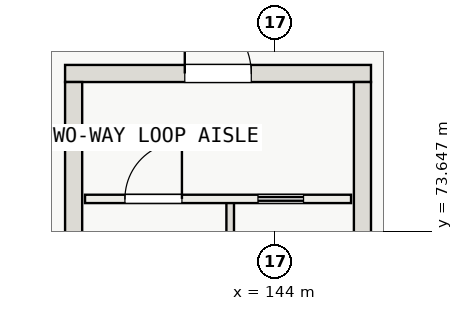
"""IFC4 building model, lengths in metres.
Left out: names, types, materials, properties, quantities, classifications, styles, units other than length and angle.
Written with IfcOpenShell. Run it as: python <this file> out.ifc"""

import sys

from ifc_helpers import new_model, si_unit, direction, frame, frame_2d, origin, place, context, subcontext, project, spatial, rectangle, extrude, element, fill, save


model = new_model("IFC4")
c1 = context("Model", 3, precision=1e-05, world=origin(), true_north=direction((0.0, 1.0)))
c2 = subcontext(c1, "Body", "Model", "MODEL_VIEW")
j1 = project(units=[si_unit("LENGTHUNIT", "METRE"), si_unit("PLANEANGLEUNIT", "RADIAN")], contexts=[c1])
p1 = place(None, origin())
s1 = spatial("IfcSite", under=j1, at=p1, CompositionType="ELEMENT")
p2 = place(p1, origin())
s2 = spatial("IfcBuilding", under=s1, at=p2, CompositionType="ELEMENT")
p3 = place(p2, frame((0.0, 0.0, -4.8)))
s3 = spatial("IfcBuildingStorey", under=s2, at=p3, CompositionType="ELEMENT", Elevation=-4.8)
p4 = place(p3, frame((138.475, 77.8, -0.45), z_axis=(0.0, 0.0, 1.0), x_axis=(1.0, 0.0, 0.0)))
e1 = element("IfcWall", 1, at=p4, inside=s3, PredefinedType="SHEAR", context=c2, shape_type="SweptSolid", body=[
    extrude(rectangle(XDim=8.05, YDim=0.45, at=frame_2d((4.025, 0.0))), origin(), (0.0, 0.0, 1.0), 5.25),
])
p5 = place(p4, frame((3.15, 0.0, 0.45)))
e2 = element("IfcOpeningElement", 2, at=p5, cuts=e1, PredefinedType="OPENING", context=c2, shape_type="SweptSolid", body=[
    extrude(rectangle(XDim=1.75, YDim=2.3, at=frame_2d((0.875, 1.15))), frame((0.0, 0.235, 0.0), z_axis=(0.0, -1.0, 0.0), x_axis=(1.0, 0.0, 0.0)), (0.0, 0.0, 1.0), 0.47),
])
for number, where, z_axis, x_axis in (
    (3, (138.7, 66.425, -0.45), (0.0, 0.0, 1.0), (0.0, 1.0, 0.0)),
    (4, (146.3, 66.425, -0.45), (0.0, 0.0, 1.0), (0.0, 1.0, 0.0)),
):
    element("IfcWall", number, at=place(p3, frame(where, z_axis=z_axis, x_axis=x_axis)), inside=s3, PredefinedType="SHEAR", context=c2, shape_type="SweptSolid", body=[
        extrude(rectangle(XDim=11.15, YDim=0.45, at=frame_2d((5.575, 0.0))), origin(), (0.0, 0.0, 1.0), 5.25),
    ])
p6 = place(p3, frame((142.82, 66.45, -0.45), z_axis=(0.0, 0.0, 1.0), x_axis=(0.0, 1.0, 0.0)))
e5 = element("IfcWall", 5, at=p6, inside=s3, PredefinedType="SOLIDWALL", context=c2, shape_type="SweptSolid", body=[
    extrude(rectangle(XDim=8.0, YDim=0.2, at=frame_2d((4.0, 0.0))), origin(), (0.0, 0.0, 1.0), 5.25),
])
p7 = place(p3, frame((139.0, 74.5, 0.0), z_axis=(0.0, 0.0, 1.0), x_axis=(1.0, 0.0, 0.0)))
e6 = element("IfcWall", 6, at=p7, inside=s3, PredefinedType="SOLIDWALL", context=c2, shape_type="SweptSolid", body=[
    extrude(rectangle(XDim=7.0, YDim=0.22, at=frame_2d((3.5, 0.0))), origin(), (0.0, 0.0, 1.0), 4.4),
])
p8 = place(p7, frame((1.05, 0.0, 0.0)))
e7 = element("IfcOpeningElement", 7, at=p8, cuts=e6, PredefinedType="OPENING", context=c2, shape_type="SweptSolid", body=[
    extrude(rectangle(XDim=1.5, YDim=2.2, at=frame_2d((0.75, 1.1))), frame((0.0, 0.12, 0.0), z_axis=(0.0, -1.0, 0.0), x_axis=(1.0, 0.0, 0.0)), (0.0, 0.0, 1.0), 0.24),
])
p9 = place(p7, frame((4.55, 0.0, 0.0)))
e8 = element("IfcOpeningElement", 8, at=p9, cuts=e6, PredefinedType="OPENING", context=c2, shape_type="SweptSolid", body=[
    extrude(rectangle(XDim=1.2, YDim=2.2, at=frame_2d((0.6, 1.1))), frame((0.0, 0.12, 0.0), z_axis=(0.0, -1.0, 0.0), x_axis=(1.0, 0.0, 0.0)), (0.0, 0.0, 1.0), 0.24),
])
p10 = place(p8, origin())
e9 = element("IfcDoor", 9, at=p10, inside=s3, OperationType="SINGLE_SWING_RIGHT", PredefinedType="DOOR", context=c2, shape_type="SweptSolid", body=[
    extrude(rectangle(XDim=1.5, YDim=2.2, at=frame_2d((0.75, 1.1))), frame((0.0, 0.025, 0.0), z_axis=(0.0, -1.0, 0.0), x_axis=(1.0, 0.0, 0.0)), (0.0, 0.0, 1.0), 0.05),
])
fill(e7, e9)
p11 = place(p9, origin())
e10 = element("IfcDoor", 10, at=p11, inside=s3, OperationType="SLIDING_TO_RIGHT", PredefinedType="DOOR", context=c2, shape_type="SweptSolid", body=[
    extrude(rectangle(XDim=1.2, YDim=2.2, at=frame_2d((0.6, 1.1))), frame((0.0, 0.025, 0.0), z_axis=(0.0, -1.0, 0.0), x_axis=(1.0, 0.0, 0.0)), (0.0, 0.0, 1.0), 0.05),
])
fill(e8, e10)
p12 = place(p5, origin())
e11 = element("IfcDoor", 11, at=p12, inside=s3, OperationType="DOUBLE_DOOR_SINGLE_SWING", PredefinedType="DOOR", context=c2, shape_type="SweptSolid", body=[
    extrude(rectangle(XDim=1.75, YDim=2.3, at=frame_2d((0.875, 1.15))), frame((0.0, 0.025, 0.0), z_axis=(0.0, -1.0, 0.0), x_axis=(1.0, 0.0, 0.0)), (0.0, 0.0, 1.0), 0.05),
])
fill(e2, e11)
save(model, sys.argv[1])
